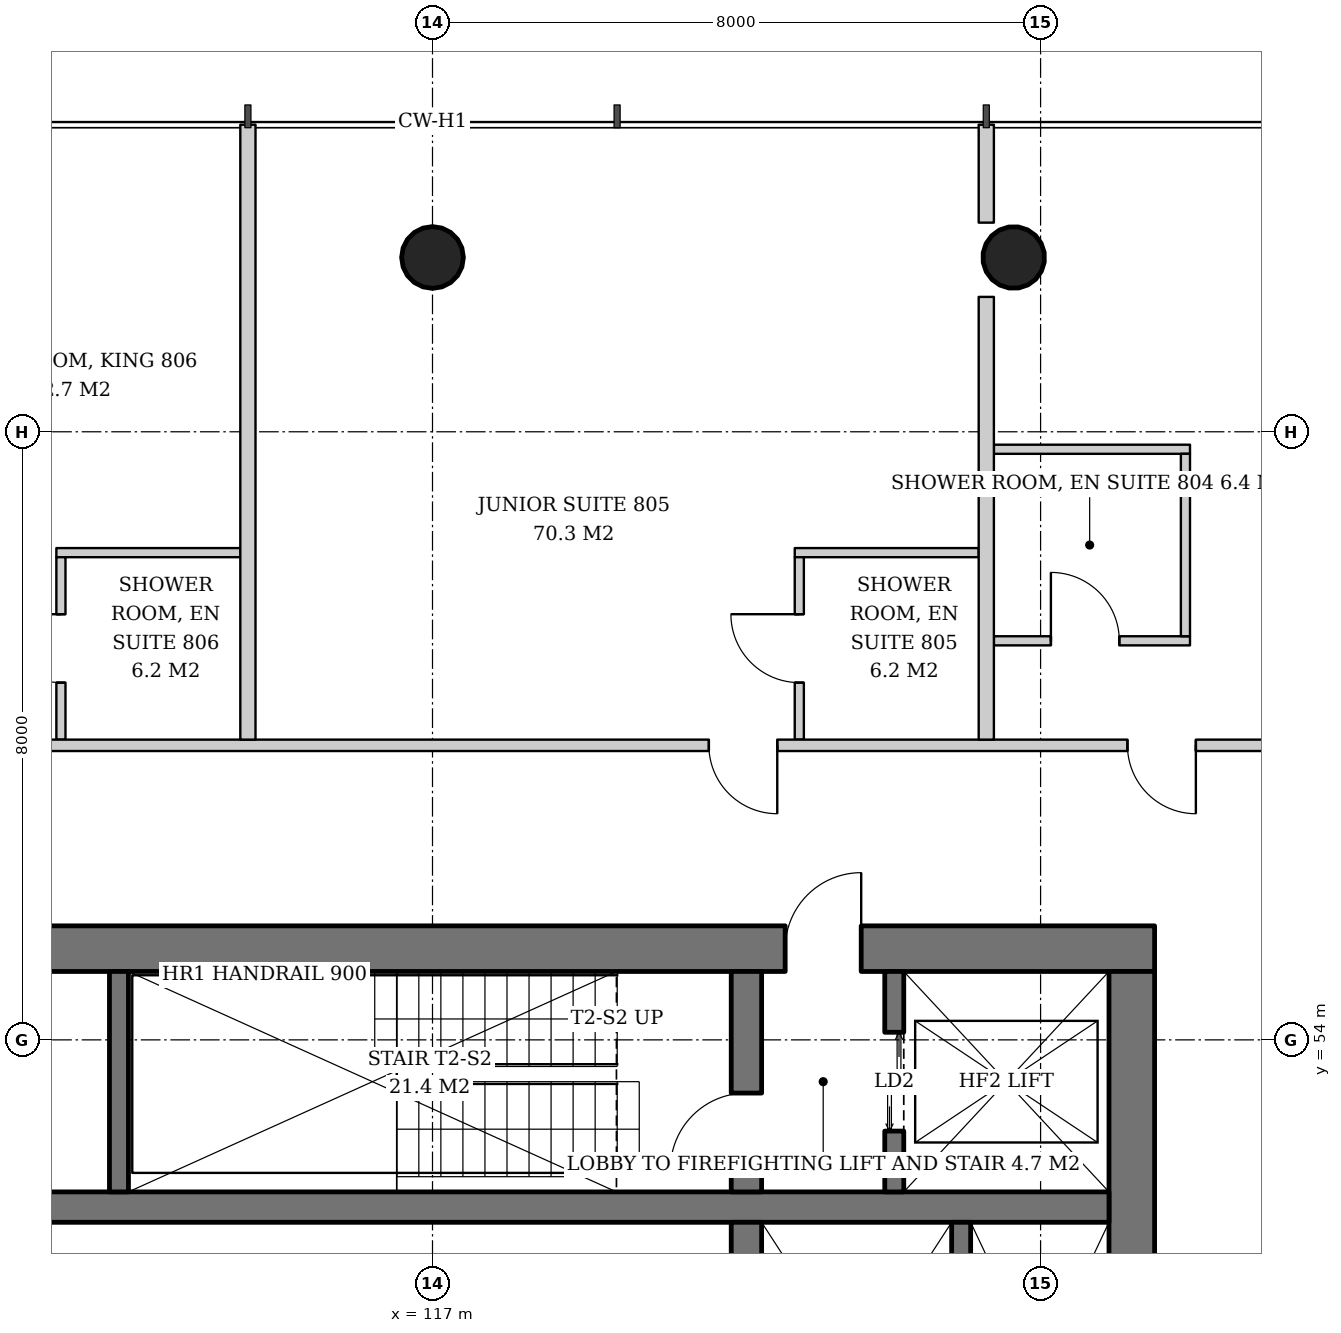
"""IFC4 building model, lengths in metres.
Left out: names, types, materials, properties, quantities, classifications, styles, units other than length and angle.
Written with IfcOpenShell. Run it as: python <this file> out.ifc"""

import sys

from ifc_helpers import new_model, si_unit, direction, frame, frame_2d, origin, origin_2d, place, context, subcontext, project, spatial, rectangle, hollow_circle, extrude, element, fill, save


model = new_model("IFC4")
c1 = context("Model", 3, precision=1e-05, world=origin(), true_north=direction((0.0, 1.0)))
c2 = subcontext(c1, "Body", "Model", "MODEL_VIEW")
j1 = project(units=[si_unit("LENGTHUNIT", "METRE"), si_unit("PLANEANGLEUNIT", "RADIAN")], contexts=[c1])
p1 = place(None, origin())
s1 = spatial("IfcSite", under=j1, at=p1, CompositionType="ELEMENT")
p2 = place(p1, origin())
s2 = spatial("IfcBuilding", under=s1, at=p2, CompositionType="ELEMENT")
p3 = place(p2, frame((0.0, 0.0, 36.2)))
s3 = spatial("IfcBuildingStorey", under=s2, at=p3, CompositionType="ELEMENT", Elevation=36.2)
p4 = place(p3, frame((124.672, 64.345, 0.0), z_axis=(-0.021497765643, -0.042995531285, 0.998843946952), x_axis=(0.894427191, -0.4472135955, 0.0)))
e1 = element("IfcColumn", 1, at=p4, inside=s3, PredefinedType="COLUMN", context=c2, shape_type="SweptSolid", body=[
    extrude(hollow_circle(Radius=0.406, WallThickness=0.03, at=origin_2d()), origin(), (0.0, 0.0, 1.0), 3.804),
])
p5 = place(p3, frame((117.0, 64.345, 0.0), z_axis=(0.0, -0.043005470007, 0.999074836811), x_axis=(1.0, 0.0, 0.0)))
e2 = element("IfcColumn", 2, at=p5, inside=s3, PredefinedType="COLUMN", context=c2, shape_type="SweptSolid", body=[
    extrude(hollow_circle(Radius=0.406, WallThickness=0.03, at=origin_2d()), origin(), (0.0, 0.0, 1.0), 3.803),
])
p6 = place(p3, frame((107.5, 55.2, 0.0), z_axis=(0.0, 0.0, 1.0), x_axis=(1.0, 0.0, 0.0)))
e3 = element("IfcWall", 3, at=p6, inside=s3, PredefinedType="SHEAR", context=c2, shape_type="SweptSolid", body=[
    extrude(rectangle(XDim=19.0, YDim=0.6, at=frame_2d((9.5, 0.0))), origin(), (0.0, 0.0, 1.0), 3.8),
])
p7 = place(p6, frame((14.14, 0.0, 0.0)))
e4 = element("IfcOpeningElement", 4, at=p7, cuts=e3, PredefinedType="OPENING", context=c2, shape_type="SweptSolid", body=[
    extrude(rectangle(XDim=1.0, YDim=2.1, at=frame_2d((0.5, 1.05))), frame((0.0, 0.31, 0.0), z_axis=(0.0, -1.0, 0.0), x_axis=(1.0, 0.0, 0.0)), (0.0, 0.0, 1.0), 0.62),
])
p8 = place(p6, frame((2.425, 0.0, 0.0)))
e5 = element("IfcOpeningElement", 5, at=p8, cuts=e3, PredefinedType="OPENING", context=c2, shape_type="SweptSolid", body=[
    extrude(rectangle(XDim=1.0, YDim=2.1, at=frame_2d((0.5, 1.05))), frame((0.0, 0.31, 0.0), z_axis=(0.0, -1.0, 0.0), x_axis=(1.0, 0.0, 0.0)), (0.0, 0.0, 1.0), 0.62),
])
p9 = place(p3, frame((126.2, 37.1, 0.0), z_axis=(0.0, 0.0, 1.0), x_axis=(0.0, 1.0, 0.0)))
e6 = element("IfcWall", 6, at=p9, inside=s3, PredefinedType="SHEAR", context=c2, shape_type="SweptSolid", body=[
    extrude(rectangle(XDim=17.8, YDim=0.6, at=frame_2d((8.9, 0.0))), origin(), (0.0, 0.0, 1.0), 3.8),
])
p10 = place(p9, frame((8.0, 0.0, 0.0)))
e7 = element("IfcOpeningElement", 7, at=p10, cuts=e6, PredefinedType="OPENING", context=c2, shape_type="SweptSolid", body=[
    extrude(rectangle(XDim=1.8, YDim=2.4, at=frame_2d((0.9, 1.2))), frame((0.0, 0.31, 0.0), z_axis=(0.0, -1.0, 0.0), x_axis=(1.0, 0.0, 0.0)), (0.0, 0.0, 1.0), 0.62),
])
p11 = place(p3, frame((108.1, 51.8, 0.0), z_axis=(0.0, 0.0, 1.0), x_axis=(1.0, 0.0, 0.0)))
e8 = element("IfcWall", 8, at=p11, inside=s3, PredefinedType="SHEAR", context=c2, shape_type="SweptSolid", body=[
    extrude(rectangle(XDim=17.8, YDim=0.4, at=frame_2d((8.9, 0.0))), origin(), (0.0, 0.0, 1.0), 3.8),
])
p12 = place(p3, frame((121.13, 40.4, 0.0), z_axis=(0.0, 0.0, 1.0), x_axis=(0.0, 1.0, 0.0)))
e9 = element("IfcWall", 9, at=p12, inside=s3, PredefinedType="SHEAR", context=c2, shape_type="SweptSolid", body=[
    extrude(rectangle(XDim=11.2, YDim=0.4, at=frame_2d((5.6, 0.0))), origin(), (0.0, 0.0, 1.0), 3.8),
])
p13 = place(p3, frame((121.13, 52.0, 0.0), z_axis=(0.0, 0.0, 1.0), x_axis=(0.0, 1.0, 0.0)))
e10 = element("IfcWall", 10, at=p13, inside=s3, PredefinedType="SHEAR", context=c2, shape_type="SweptSolid", body=[
    extrude(rectangle(XDim=2.9, YDim=0.4, at=frame_2d((1.45, 0.0))), origin(), (0.0, 0.0, 1.0), 3.8),
])
p14 = place(p13, frame((0.3, 0.0, 0.0)))
e11 = element("IfcOpeningElement", 11, at=p14, cuts=e10, PredefinedType="OPENING", context=c2, shape_type="SweptSolid", body=[
    extrude(rectangle(XDim=1.0, YDim=2.1, at=frame_2d((0.5, 1.05))), frame((0.0, 0.21, 0.0), z_axis=(0.0, -1.0, 0.0), x_axis=(1.0, 0.0, 0.0)), (0.0, 0.0, 1.0), 0.42),
])
p15 = place(p3, frame((112.875, 52.0, 0.0), z_axis=(0.0, 0.0, 1.0), x_axis=(0.0, 1.0, 0.0)))
e12 = element("IfcWall", 12, at=p15, inside=s3, PredefinedType="SHEAR", context=c2, shape_type="SweptSolid", body=[
    extrude(rectangle(XDim=2.9, YDim=0.25, at=frame_2d((1.45, 0.0))), origin(), (0.0, 0.0, 1.0), 3.8),
])
p16 = place(p3, frame((123.075, 52.0, 0.0), z_axis=(0.0, 0.0, 1.0), x_axis=(0.0, 1.0, 0.0)))
e13 = element("IfcWall", 13, at=p16, inside=s3, PredefinedType="SHEAR", context=c2, shape_type="SweptSolid", body=[
    extrude(rectangle(XDim=2.9, YDim=0.25, at=frame_2d((1.45, 0.0))), origin(), (0.0, 0.0, 1.0), 3.8),
])
p17 = place(p16, frame((0.8, 0.0, 0.0)))
e14 = element("IfcOpeningElement", 14, at=p17, cuts=e13, PredefinedType="OPENING", context=c2, shape_type="SweptSolid", body=[
    extrude(rectangle(XDim=1.3, YDim=2.2, at=frame_2d((0.65, 1.1))), frame((0.0, 0.135, 0.0), z_axis=(0.0, -1.0, 0.0), x_axis=(1.0, 0.0, 0.0)), (0.0, 0.0, 1.0), 0.27),
])
p18 = place(p3, frame((123.955, 47.75, 0.0), z_axis=(0.0, 0.0, 1.0), x_axis=(0.0, 1.0, 0.0)))
e15 = element("IfcWall", 15, at=p18, inside=s3, PredefinedType="SHEAR", context=c2, shape_type="SweptSolid", body=[
    extrude(rectangle(XDim=3.85, YDim=0.25, at=frame_2d((1.925, 0.0))), origin(), (0.0, 0.0, 1.0), 3.8),
])
p19 = place(p3, frame((124.386, 59.25, 0.0), z_axis=(0.0, 0.0, 1.0), x_axis=(1.0, 0.0, 0.0)))
e16 = element("IfcWall", 16, at=p19, inside=s3, PredefinedType="PARTITIONING", context=c2, shape_type="SweptSolid", body=[
    extrude(rectangle(XDim=2.58, YDim=0.12, at=frame_2d((1.29, 0.0))), origin(), (0.0, 0.0, 1.0), 2.8),
])
p20 = place(p19, frame((0.75, 0.0, 0.0)))
e17 = element("IfcOpeningElement", 17, at=p20, cuts=e16, PredefinedType="OPENING", context=c2, shape_type="SweptSolid", body=[
    extrude(rectangle(XDim=0.9, YDim=2.1, at=frame_2d((0.45, 1.05))), frame((0.0, 0.07, 0.0), z_axis=(0.0, -1.0, 0.0), x_axis=(1.0, 0.0, 0.0)), (0.0, 0.0, 1.0), 0.14),
])
p21 = place(p3, frame((124.386, 61.77, 0.0), z_axis=(0.0, 0.0, 1.0), x_axis=(1.0, 0.0, 0.0)))
e18 = element("IfcWall", 18, at=p21, inside=s3, PredefinedType="PARTITIONING", context=c2, shape_type="SweptSolid", body=[
    extrude(rectangle(XDim=2.58, YDim=0.12, at=frame_2d((1.29, 0.0))), origin(), (0.0, 0.0, 1.0), 2.8),
])
p22 = place(p3, frame((126.906, 59.31, 0.0), z_axis=(0.0, 0.0, 1.0), x_axis=(0.0, 1.0, 0.0)))
e19 = element("IfcWall", 19, at=p22, inside=s3, PredefinedType="PARTITIONING", context=c2, shape_type="SweptSolid", body=[
    extrude(rectangle(XDim=2.4, YDim=0.12, at=frame_2d((1.2, 0.0))), origin(), (0.0, 0.0, 1.0), 2.847),
])
p23 = place(p3, frame((124.186, 60.41, 0.0), z_axis=(0.0, 0.0, 1.0), x_axis=(-1.0, 0.0, 0.0)))
e20 = element("IfcWall", 20, at=p23, inside=s3, PredefinedType="PARTITIONING", context=c2, shape_type="SweptSolid", body=[
    extrude(rectangle(XDim=2.42, YDim=0.12, at=frame_2d((1.21, 0.0))), origin(), (0.0, 0.0, 1.0), 2.847),
])
p24 = place(p3, frame((121.826, 57.95, 0.0), z_axis=(0.0, 0.0, 1.0), x_axis=(0.0, 1.0, 0.0)))
e21 = element("IfcWall", 21, at=p24, inside=s3, PredefinedType="PARTITIONING", context=c2, shape_type="SweptSolid", body=[
    extrude(rectangle(XDim=2.4, YDim=0.12, at=frame_2d((1.2, 0.0))), origin(), (0.0, 0.0, 1.0), 3.6),
])
p25 = place(p24, frame((0.75, 0.0, 0.0)))
e22 = element("IfcOpeningElement", 22, at=p25, cuts=e21, PredefinedType="OPENING", context=c2, shape_type="SweptSolid", body=[
    extrude(rectangle(XDim=0.9, YDim=2.1, at=frame_2d((0.45, 1.05))), frame((0.0, 0.07, 0.0), z_axis=(0.0, -1.0, 0.0), x_axis=(1.0, 0.0, 0.0)), (0.0, 0.0, 1.0), 0.14),
])
p26 = place(p3, frame((114.471, 60.41, 0.0), z_axis=(0.0, 0.0, 1.0), x_axis=(-1.0, 0.0, 0.0)))
e23 = element("IfcWall", 23, at=p26, inside=s3, PredefinedType="PARTITIONING", context=c2, shape_type="SweptSolid", body=[
    extrude(rectangle(XDim=2.42, YDim=0.12, at=frame_2d((1.21, 0.0))), origin(), (0.0, 0.0, 1.0), 2.847),
])
p27 = place(p3, frame((112.111, 57.95, 0.0), z_axis=(0.0, 0.0, 1.0), x_axis=(0.0, 1.0, 0.0)))
e24 = element("IfcWall", 24, at=p27, inside=s3, PredefinedType="PARTITIONING", context=c2, shape_type="SweptSolid", body=[
    extrude(rectangle(XDim=2.4, YDim=0.12, at=frame_2d((1.2, 0.0))), origin(), (0.0, 0.0, 1.0), 3.6),
])
p28 = place(p27, frame((0.75, 0.0, 0.0)))
e25 = element("IfcOpeningElement", 25, at=p28, cuts=e24, PredefinedType="OPENING", context=c2, shape_type="SweptSolid", body=[
    extrude(rectangle(XDim=0.9, YDim=2.1, at=frame_2d((0.45, 1.05))), frame((0.0, 0.07, 0.0), z_axis=(0.0, -1.0, 0.0), x_axis=(1.0, 0.0, 0.0)), (0.0, 0.0, 1.0), 0.14),
])
p29 = place(p3, frame((128.95, 57.875, 0.0), z_axis=(0.0, 0.0, 1.0), x_axis=(-1.0, 0.0, 0.0)))
e26 = element("IfcWall", 26, at=p29, inside=s3, PredefinedType="PARTITIONING", context=c2, shape_type="SweptSolid", body=[
    extrude(rectangle(XDim=23.75, YDim=0.15, at=frame_2d((11.875, 0.0))), origin(), (0.0, 0.0, 1.0), 2.8),
])
p30 = place(p29, frame((1.907, 0.0, 0.0)))
e27 = element("IfcOpeningElement", 27, at=p30, cuts=e26, PredefinedType="OPENING", context=c2, shape_type="SweptSolid", body=[
    extrude(rectangle(XDim=0.9, YDim=2.1, at=frame_2d((0.45, 1.05))), frame((0.0, 0.085, 0.0), z_axis=(0.0, -1.0, 0.0), x_axis=(1.0, 0.0, 0.0)), (0.0, 0.0, 1.0), 0.17),
])
p31 = place(p29, frame((7.414, 0.0, 0.0)))
e28 = element("IfcOpeningElement", 28, at=p31, cuts=e26, PredefinedType="OPENING", context=c2, shape_type="SweptSolid", body=[
    extrude(rectangle(XDim=0.9, YDim=2.1, at=frame_2d((0.45, 1.05))), frame((0.0, 0.085, 0.0), z_axis=(0.0, -1.0, 0.0), x_axis=(1.0, 0.0, 0.0)), (0.0, 0.0, 1.0), 0.17),
])
p32 = place(p29, frame((17.129, 0.0, 0.0)))
e29 = element("IfcOpeningElement", 29, at=p32, cuts=e26, PredefinedType="OPENING", context=c2, shape_type="SweptSolid", body=[
    extrude(rectangle(XDim=0.9, YDim=2.1, at=frame_2d((0.45, 1.05))), frame((0.0, 0.085, 0.0), z_axis=(0.0, -1.0, 0.0), x_axis=(1.0, 0.0, 0.0)), (0.0, 0.0, 1.0), 0.17),
])
p33 = place(p3, frame((124.286, 57.95, 0.0), z_axis=(0.0, 0.0, 1.0), x_axis=(0.0, 1.0, 0.0)))
e30 = element("IfcWall", 30, at=p33, inside=s3, PredefinedType="PARTITIONING", context=c2, shape_type="SweptSolid", body=[
    extrude(rectangle(XDim=5.824, YDim=0.2, at=frame_2d((2.912, 0.0))), origin(), (0.0, 0.0, 1.0), 3.6),
])
p34 = place(p3, frame((124.286, 64.751, 0.0), z_axis=(0.0, 0.0, 1.0), x_axis=(0.0, 1.0, 0.0)))
e31 = element("IfcWall", 31, at=p34, inside=s3, PredefinedType="PARTITIONING", context=c2, shape_type="SweptSolid", body=[
    extrude(rectangle(XDim=1.289, YDim=0.2, at=frame_2d((0.645, 0.0))), origin(), (0.0, 0.0, 1.0), 3.6),
])
p35 = place(p3, frame((114.572, 57.95, 0.0), z_axis=(0.0, 0.0, 1.0), x_axis=(0.0, 1.0, 0.0)))
e32 = element("IfcWall", 32, at=p35, inside=s3, PredefinedType="PARTITIONING", context=c2, shape_type="SweptSolid", body=[
    extrude(rectangle(XDim=8.09, YDim=0.2, at=frame_2d((4.045, 0.0))), origin(), (0.0, 0.0, 1.0), 2.847),
])
p36 = place(p17, origin())
e33 = element("IfcDoor", 33, at=p36, inside=s3, OperationType="DOUBLE_DOOR_SLIDING", PredefinedType="DOOR", context=c2, shape_type="SweptSolid", body=[
    extrude(rectangle(XDim=1.3, YDim=2.2, at=frame_2d((0.65, 1.1))), frame((0.0, 0.025, 0.0), z_axis=(0.0, -1.0, 0.0), x_axis=(1.0, 0.0, 0.0)), (0.0, 0.0, 1.0), 0.05),
])
fill(e14, e33)
p37 = place(p14, origin())
e34 = element("IfcDoor", 34, at=p37, inside=s3, OperationType="SINGLE_SWING_LEFT", PredefinedType="DOOR", context=c2, shape_type="SweptSolid", body=[
    extrude(rectangle(XDim=1.0, YDim=2.1, at=frame_2d((0.5, 1.05))), frame((0.0, 0.025, 0.0), z_axis=(0.0, -1.0, 0.0), x_axis=(1.0, 0.0, 0.0)), (0.0, 0.0, 1.0), 0.05),
])
fill(e11, e34)
p38 = place(p7, origin())
e35 = element("IfcDoor", 35, at=p38, inside=s3, OperationType="SINGLE_SWING_RIGHT", PredefinedType="DOOR", context=c2, shape_type="SweptSolid", body=[
    extrude(rectangle(XDim=1.0, YDim=2.1, at=frame_2d((0.5, 1.05))), frame((0.0, 0.025, 0.0), z_axis=(0.0, -1.0, 0.0), x_axis=(1.0, 0.0, 0.0)), (0.0, 0.0, 1.0), 0.05),
])
fill(e4, e35)
p39 = place(p20, origin())
e36 = element("IfcDoor", 36, at=p39, inside=s3, OperationType="SINGLE_SWING_LEFT", PredefinedType="DOOR", context=c2, shape_type="SweptSolid", body=[
    extrude(rectangle(XDim=0.9, YDim=2.1, at=frame_2d((0.45, 1.05))), frame((0.0, 0.025, 0.0), z_axis=(0.0, -1.0, 0.0), x_axis=(1.0, 0.0, 0.0)), (0.0, 0.0, 1.0), 0.05),
])
fill(e17, e36)
p40 = place(p25, origin())
e37 = element("IfcDoor", 37, at=p40, inside=s3, OperationType="SINGLE_SWING_RIGHT", PredefinedType="DOOR", context=c2, shape_type="SweptSolid", body=[
    extrude(rectangle(XDim=0.9, YDim=2.1, at=frame_2d((0.45, 1.05))), frame((0.0, 0.025, 0.0), z_axis=(0.0, -1.0, 0.0), x_axis=(1.0, 0.0, 0.0)), (0.0, 0.0, 1.0), 0.05),
])
fill(e22, e37)
p41 = place(p28, origin())
e38 = element("IfcDoor", 38, at=p41, inside=s3, OperationType="SINGLE_SWING_RIGHT", PredefinedType="DOOR", context=c2, shape_type="SweptSolid", body=[
    extrude(rectangle(XDim=0.9, YDim=2.1, at=frame_2d((0.45, 1.05))), frame((0.0, 0.025, 0.0), z_axis=(0.0, -1.0, 0.0), x_axis=(1.0, 0.0, 0.0)), (0.0, 0.0, 1.0), 0.05),
])
fill(e25, e38)
p42 = place(p30, origin())
e39 = element("IfcDoor", 39, at=p42, inside=s3, OperationType="SINGLE_SWING_LEFT", PredefinedType="DOOR", context=c2, shape_type="SweptSolid", body=[
    extrude(rectangle(XDim=0.9, YDim=2.1, at=frame_2d((0.45, 1.05))), frame((0.0, 0.025, 0.0), z_axis=(0.0, -1.0, 0.0), x_axis=(1.0, 0.0, 0.0)), (0.0, 0.0, 1.0), 0.05),
])
fill(e27, e39)
p43 = place(p31, origin())
e40 = element("IfcDoor", 40, at=p43, inside=s3, OperationType="SINGLE_SWING_LEFT", PredefinedType="DOOR", context=c2, shape_type="SweptSolid", body=[
    extrude(rectangle(XDim=0.9, YDim=2.1, at=frame_2d((0.45, 1.05))), frame((0.0, 0.025, 0.0), z_axis=(0.0, -1.0, 0.0), x_axis=(1.0, 0.0, 0.0)), (0.0, 0.0, 1.0), 0.05),
])
fill(e28, e40)
save(model, sys.argv[1])
